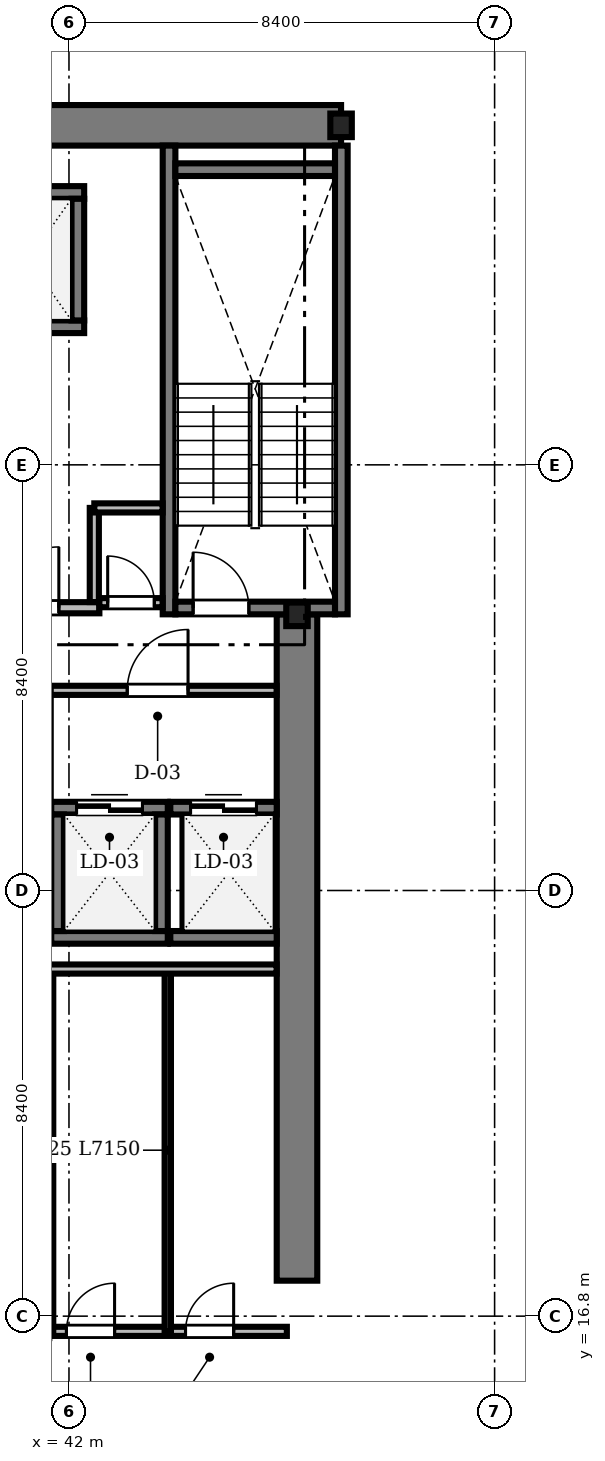
"""IFC4 building model, lengths in metres.
Left out: names, types, materials, properties, quantities, classifications, styles, units other than length and angle.
Written with IfcOpenShell. Run it as: python <this file> out.ifc"""

import sys

from ifc_helpers import new_model, si_unit, direction, frame, frame_2d, origin, origin_2d, place, context, subcontext, project, spatial, rectangle, i_section, extrude, source, transform, mapped, element, fill, save


model = new_model("IFC4")
c1 = context("Model", 3, precision=1e-05, world=origin(), true_north=direction((0.0, 1.0)))
c2 = subcontext(c1, "Body", "Model", "MODEL_VIEW")
j1 = project(units=[si_unit("LENGTHUNIT", "METRE"), si_unit("PLANEANGLEUNIT", "RADIAN")], contexts=[c1])
p1 = place(None, origin())
s1 = spatial("IfcSite", under=j1, at=p1, CompositionType="ELEMENT")
p2 = place(p1, origin())
s2 = spatial("IfcBuilding", under=s1, at=p2, CompositionType="ELEMENT")
p3 = place(p2, frame((0.0, 0.0, 126.1)))
s3 = spatial("IfcBuildingStorey", under=s2, at=p3, CompositionType="ELEMENT", Elevation=126.1)
m1 = source(origin(), c2, "Body", "SweptSolid", [
    extrude(rectangle(XDim=17.52, YDim=0.8, at=frame_2d((8.76, 0.0))), origin(), (0.0, 0.0, 1.0), 3.46),
])
p4 = place(p3, frame((29.85, 40.3, 0.0), z_axis=(0.0, 0.0, 1.0), x_axis=(1.0, 0.0, 0.0)))
e1 = element("IfcWall", 1, at=p4, inside=s3, PredefinedType="SHEAR", context=c2, shape_type="MappedRepresentation", body=[
    mapped(m1, transform((0.0, 0.0, 0.0), scale=1.0)),
])
m2 = source(origin(), c2, "Body", "SweptSolid", [
    extrude(rectangle(XDim=13.15, YDim=0.8, at=frame_2d((6.575, 0.0))), origin(), (0.0, 0.0, 1.0), 3.46),
])
p5 = place(p3, frame((46.5, 17.5, 0.0), z_axis=(0.0, 0.0, 1.0), x_axis=(0.0, 1.0, 0.0)))
e2 = element("IfcWall", 2, at=p5, inside=s3, PredefinedType="SHEAR", context=c2, shape_type="MappedRepresentation", body=[
    mapped(m2, transform((0.0, 0.0, 0.0), scale=1.0)),
])
m3 = source(origin(), c2, "Body", "SweptSolid", [
    extrude(i_section(OverallWidth=0.424, OverallDepth=0.465, WebThickness=0.035, FlangeThickness=0.056, FilletRadius=0.015, at=origin_2d()), origin(), (0.0, 0.0, 1.0), 3.46),
])
for number, where, z_axis, x_axis in (
    (3, (46.5, 30.65, 0.0), (0.0, 0.0, 1.0), (1.0, 0.0, 0.0)),
    (4, (47.37, 40.3, 0.0), (0.0, 0.0, 1.0), (1.0, 0.0, 0.0)),
):
    element("IfcColumn", number, at=place(p3, frame(where, z_axis=z_axis, x_axis=x_axis)), inside=s3, PredefinedType="COLUMN", context=c2, shape_type="MappedRepresentation", body=[
        mapped(m3, transform((0.0, 0.0, 0.0), scale=1.0)),
    ])
m4 = source(origin(), c2, "Body", "SweptSolid", [
    extrude(rectangle(XDim=9.25, YDim=0.25, at=frame_2d((4.625, 0.0))), origin(), (0.0, 0.0, 1.0), 3.5),
])
for number, where, z_axis, x_axis in (
    (5, (43.975, 30.65, 0.0), (0.0, 0.0, 1.0), (0.0, 1.0, 0.0)),
    (6, (47.375, 30.65, 0.0), (0.0, 0.0, 1.0), (0.0, 1.0, 0.0)),
):
    element("IfcWall", number, at=place(p3, frame(where, z_axis=z_axis, x_axis=x_axis)), inside=s3, PredefinedType="SOLIDWALL", context=c2, shape_type="MappedRepresentation", body=[
        mapped(m4, transform((0.0, 0.0, 0.0), scale=1.0)),
    ])
m5 = source(origin(), c2, "Body", "SweptSolid", [
    extrude(rectangle(XDim=3.15, YDim=0.25, at=frame_2d((1.575, 0.0))), origin(), (0.0, 0.0, 1.0), 3.5),
])
p6 = place(p3, frame((44.1, 39.425, 0.0), z_axis=(0.0, 0.0, 1.0), x_axis=(1.0, 0.0, 0.0)))
e7 = element("IfcWall", 7, at=p6, inside=s3, PredefinedType="SOLIDWALL", context=c2, shape_type="MappedRepresentation", body=[
    mapped(m5, transform((0.0, 0.0, 0.0), scale=1.0)),
])
p7 = place(p3, frame((44.1, 30.775, 0.0), z_axis=(0.0, 0.0, 1.0), x_axis=(1.0, 0.0, 0.0)))
e8 = element("IfcWall", 8, at=p7, inside=s3, PredefinedType="SOLIDWALL", context=c2, shape_type="MappedRepresentation", body=[
    mapped(m5, transform((0.0, 0.0, 0.0), scale=1.0)),
])
m6 = source(origin(), c2, "Body", "SweptSolid", [
    extrude(rectangle(XDim=1.1, YDim=2.2, at=frame_2d((0.55, 1.1))), frame((0.0, 0.135, 0.0), z_axis=(0.0, -1.0, 0.0), x_axis=(1.0, 0.0, 0.0)), (0.0, 0.0, 1.0), 0.27),
])
p8 = place(p7, frame((0.35, 0.0, 0.0)))
e9 = element("IfcOpeningElement", 9, at=p8, cuts=e8, PredefinedType="OPENING", context=c2, shape_type="MappedRepresentation", body=[
    mapped(m6, transform((0.0, 0.0, 0.0), scale=1.0)),
])
m7 = source(origin(), c2, "Body", "SweptSolid", [
    extrude(rectangle(XDim=2.8, YDim=0.22, at=frame_2d((1.4, 0.0))), origin(), (0.0, 0.0, 1.0), 3.46),
])
p9 = place(p3, frame((39.8, 30.78, 0.0), z_axis=(0.0, 0.0, 1.0), x_axis=(1.0, 0.0, 0.0)))
e10 = element("IfcWall", 10, at=p9, inside=s3, PredefinedType="SOLIDWALL", context=c2, shape_type="MappedRepresentation", body=[
    mapped(m7, transform((0.0, 0.0, 0.0), scale=1.0)),
])
m8 = source(origin(), c2, "Body", "SweptSolid", [
    extrude(rectangle(XDim=1.2, YDim=2.2, at=frame_2d((0.6, 1.1))), frame((0.0, 0.12, 0.0), z_axis=(0.0, -1.0, 0.0), x_axis=(1.0, 0.0, 0.0)), (0.0, 0.0, 1.0), 0.24),
])
p10 = place(p9, frame((0.8, 0.0, 0.0)))
e11 = element("IfcOpeningElement", 11, at=p10, cuts=e10, PredefinedType="OPENING", context=c2, shape_type="MappedRepresentation", body=[
    mapped(m8, transform((0.0, 0.0, 0.0), scale=1.0)),
])
m9 = source(origin(), c2, "Body", "SweptSolid", [
    extrude(rectangle(XDim=2.55, YDim=0.25, at=frame_2d((1.275, 0.0))), origin(), (0.0, 0.0, 1.0), 3.46),
])
p11 = place(p3, frame((39.75, 36.325, 0.0), z_axis=(0.0, 0.0, 1.0), x_axis=(1.0, 0.0, 0.0)))
e12 = element("IfcWall", 12, at=p11, inside=s3, PredefinedType="SOLIDWALL", context=c2, shape_type="MappedRepresentation", body=[
    mapped(m9, transform((0.0, 0.0, 0.0), scale=1.0)),
])
m10 = source(origin(), c2, "Body", "SweptSolid", [
    extrude(rectangle(XDim=1.2, YDim=2.25, at=frame_2d((0.6, 1.125))), frame((0.0, 0.135, 0.0), z_axis=(0.0, -1.0, 0.0), x_axis=(1.0, 0.0, 0.0)), (0.0, 0.0, 1.0), 0.27),
])
p12 = place(p11, frame((0.675, 0.0, 0.0)))
e13 = element("IfcOpeningElement", 13, at=p12, cuts=e12, PredefinedType="OPENING", context=c2, shape_type="MappedRepresentation", body=[
    mapped(m10, transform((0.0, 0.0, 0.0), scale=1.0)),
])
p13 = place(p3, frame((39.75, 38.975, 0.0), z_axis=(0.0, 0.0, 1.0), x_axis=(1.0, 0.0, 0.0)))
e14 = element("IfcWall", 14, at=p13, inside=s3, PredefinedType="SOLIDWALL", context=c2, shape_type="MappedRepresentation", body=[
    mapped(m9, transform((0.0, 0.0, 0.0), scale=1.0)),
])
m11 = source(origin(), c2, "Body", "SweptSolid", [
    extrude(rectangle(XDim=2.4, YDim=0.25, at=frame_2d((1.2, 0.0))), origin(), (0.0, 0.0, 1.0), 3.46),
])
p14 = place(p3, frame((42.175, 36.45, 0.0), z_axis=(0.0, 0.0, 1.0), x_axis=(0.0, 1.0, 0.0)))
e15 = element("IfcWall", 15, at=p14, inside=s3, PredefinedType="SOLIDWALL", context=c2, shape_type="MappedRepresentation", body=[
    mapped(m11, transform((0.0, 0.0, 0.0), scale=1.0)),
])
m12 = source(origin(), c2, "Body", "SweptSolid", [
    extrude(rectangle(XDim=2.3, YDim=0.25, at=frame_2d((1.15, 0.0))), origin(), (0.0, 0.0, 1.0), 3.46),
])
p15 = place(p3, frame((41.65, 24.275, 0.0), z_axis=(0.0, 0.0, 1.0), x_axis=(1.0, 0.0, 0.0)))
e16 = element("IfcWall", 16, at=p15, inside=s3, PredefinedType="SOLIDWALL", context=c2, shape_type="MappedRepresentation", body=[
    mapped(m12, transform((0.0, 0.0, 0.0), scale=1.0)),
])
p16 = place(p3, frame((41.65, 26.825, 0.0), z_axis=(0.0, 0.0, 1.0), x_axis=(1.0, 0.0, 0.0)))
e17 = element("IfcWall", 17, at=p16, inside=s3, PredefinedType="SOLIDWALL", context=c2, shape_type="MappedRepresentation", body=[
    mapped(m12, transform((0.0, 0.0, 0.0), scale=1.0)),
])
m13 = source(origin(), c2, "Body", "SweptSolid", [
    extrude(rectangle(XDim=1.3, YDim=2.3, at=frame_2d((0.65, 1.15))), frame((0.0, 0.135, 0.0), z_axis=(0.0, -1.0, 0.0), x_axis=(1.0, 0.0, 0.0)), (0.0, 0.0, 1.0), 0.27),
])
p17 = place(p16, frame((0.5, 0.0, 0.0)))
e18 = element("IfcOpeningElement", 18, at=p17, cuts=e17, PredefinedType="OPENING", context=c2, shape_type="MappedRepresentation", body=[
    mapped(m13, transform((0.0, 0.0, 0.0), scale=1.0)),
])
for number, where, z_axis, x_axis in (
    (19, (41.775, 24.4, 0.0), (0.0, 0.0, 1.0), (0.0, 1.0, 0.0)),
    (20, (43.825, 24.4, 0.0), (0.0, 0.0, 1.0), (0.0, 1.0, 0.0)),
):
    element("IfcWall", number, at=place(p3, frame(where, z_axis=z_axis, x_axis=x_axis)), inside=s3, PredefinedType="SOLIDWALL", context=c2, shape_type="MappedRepresentation", body=[
        mapped(m12, transform((0.0, 0.0, 0.0), scale=1.0)),
    ])
m14 = source(origin(), c2, "Body", "SweptSolid", [
    extrude(rectangle(XDim=2.1, YDim=0.25, at=frame_2d((1.05, 0.0))), origin(), (0.0, 0.0, 1.0), 3.46),
])
p18 = place(p3, frame((44.0, 24.275, 0.0), z_axis=(0.0, 0.0, 1.0), x_axis=(1.0, 0.0, 0.0)))
e21 = element("IfcWall", 21, at=p18, inside=s3, PredefinedType="SOLIDWALL", context=c2, shape_type="MappedRepresentation", body=[
    mapped(m14, transform((0.0, 0.0, 0.0), scale=1.0)),
])
p19 = place(p3, frame((44.0, 26.825, 0.0), z_axis=(0.0, 0.0, 1.0), x_axis=(1.0, 0.0, 0.0)))
e22 = element("IfcWall", 22, at=p19, inside=s3, PredefinedType="SOLIDWALL", context=c2, shape_type="MappedRepresentation", body=[
    mapped(m14, transform((0.0, 0.0, 0.0), scale=1.0)),
])
p20 = place(p19, frame((0.4, 0.0, 0.0)))
e23 = element("IfcOpeningElement", 23, at=p20, cuts=e22, PredefinedType="OPENING", context=c2, shape_type="MappedRepresentation", body=[
    mapped(m13, transform((0.0, 0.0, 0.0), scale=1.0)),
])
m15 = source(origin(), c2, "Body", "SweptSolid", [
    extrude(rectangle(XDim=4.548, YDim=0.18, at=frame_2d((2.274, 0.0))), origin(), (0.0, 0.0, 1.0), 3.092),
])
p21 = place(p3, frame((41.55, 29.15, 0.0), z_axis=(0.0, 0.0, 1.0), x_axis=(1.0, 0.0, 0.0)))
e24 = element("IfcWall", 24, at=p21, inside=s3, PredefinedType="PARTITIONING", context=c2, shape_type="MappedRepresentation", body=[
    mapped(m15, transform((0.0, 0.0, 0.0), scale=1.0)),
])
m16 = source(origin(), c2, "Body", "SweptSolid", [
    extrude(rectangle(XDim=1.2, YDim=2.2, at=frame_2d((0.6, 1.1))), frame((0.0, 0.1, 0.0), z_axis=(0.0, -1.0, 0.0), x_axis=(1.0, 0.0, 0.0)), (0.0, 0.0, 1.0), 0.2),
])
p22 = place(p21, frame((1.6, 0.0, 0.0)))
e25 = element("IfcOpeningElement", 25, at=p22, cuts=e24, PredefinedType="OPENING", context=c2, shape_type="MappedRepresentation", body=[
    mapped(m16, transform((0.0, 0.0, 0.0), scale=1.0)),
])
m17 = source(origin(), c2, "Body", "SweptSolid", [
    extrude(rectangle(XDim=4.7, YDim=0.18, at=frame_2d((2.35, 0.0))), origin(), (0.0, 0.0, 1.0), 2.852),
])
p23 = place(p3, frame((41.6, 16.5, 0.0), z_axis=(0.0, 0.0, 1.0), x_axis=(1.0, 0.0, 0.0)))
e26 = element("IfcWall", 26, at=p23, inside=s3, PredefinedType="PARTITIONING", context=c2, shape_type="MappedRepresentation", body=[
    mapped(m17, transform((0.0, 0.0, 0.0), scale=1.0)),
])
m18 = source(origin(), c2, "Body", "SweptSolid", [
    extrude(rectangle(XDim=0.95, YDim=2.15, at=frame_2d((0.475, 1.075))), frame((0.0, 0.1, 0.0), z_axis=(0.0, -1.0, 0.0), x_axis=(1.0, 0.0, 0.0)), (0.0, 0.0, 1.0), 0.2),
])
p24 = place(p23, frame((0.35, 0.0, 0.0)))
e27 = element("IfcOpeningElement", 27, at=p24, cuts=e26, PredefinedType="OPENING", context=c2, shape_type="MappedRepresentation", body=[
    mapped(m18, transform((0.0, 0.0, 0.0), scale=1.0)),
])
p25 = place(p23, frame((2.7, 0.0, 0.0)))
e28 = element("IfcOpeningElement", 28, at=p25, cuts=e26, PredefinedType="OPENING", context=c2, shape_type="MappedRepresentation", body=[
    mapped(m18, transform((0.0, 0.0, 0.0), scale=1.0)),
])
m19 = source(origin(), c2, "Body", "SweptSolid", [
    extrude(rectangle(XDim=1.248, YDim=0.18, at=frame_2d((0.624, 0.0))), origin(), (0.0, 0.0, 1.0), 3.46),
])
p26 = place(p3, frame((42.6, 30.88, 0.0), z_axis=(0.0, 0.0, 1.0), x_axis=(1.0, 0.0, 0.0)))
e29 = element("IfcWall", 29, at=p26, inside=s3, PredefinedType="PARTITIONING", context=c2, shape_type="MappedRepresentation", body=[
    mapped(m19, transform((0.0, 0.0, 0.0), scale=1.0)),
])
m20 = source(origin(), c2, "Body", "SweptSolid", [
    extrude(rectangle(XDim=0.92, YDim=2.1, at=frame_2d((0.46, 1.05))), frame((0.0, 0.1, 0.0), z_axis=(0.0, -1.0, 0.0), x_axis=(1.0, 0.0, 0.0)), (0.0, 0.0, 1.0), 0.2),
])
p27 = place(p26, frame((0.164, 0.0, 0.0)))
e30 = element("IfcOpeningElement", 30, at=p27, cuts=e29, PredefinedType="OPENING", context=c2, shape_type="MappedRepresentation", body=[
    mapped(m20, transform((0.0, 0.0, 0.0), scale=1.0)),
])
m21 = source(origin(), c2, "Body", "SweptSolid", [
    extrude(rectangle(XDim=7.15, YDim=0.18, at=frame_2d((3.575, 0.0))), origin(), (0.0, 0.0, 1.0), 2.852),
])
p28 = place(p3, frame((41.6, 16.5, 0.0), z_axis=(0.0, 0.0, 1.0), x_axis=(0.0, 1.0, 0.0)))
e31 = element("IfcWall", 31, at=p28, inside=s3, PredefinedType="PARTITIONING", context=c2, shape_type="MappedRepresentation", body=[
    mapped(m21, transform((0.0, 0.0, 0.0), scale=1.0)),
])
m22 = source(origin(), c2, "Body", "SweptSolid", [
    extrude(rectangle(XDim=7.15, YDim=0.125, at=frame_2d((3.575, 0.0))), origin(), (0.0, 0.0, 1.0), 2.852),
])
p29 = place(p3, frame((43.95, 16.5, 0.0), z_axis=(0.0, 0.0, 1.0), x_axis=(0.0, 1.0, 0.0)))
e32 = element("IfcWall", 32, at=p29, inside=s3, PredefinedType="PARTITIONING", context=c2, shape_type="MappedRepresentation", body=[
    mapped(m22, transform((0.0, 0.0, 0.0), scale=1.0)),
])
m23 = source(origin(), c2, "Body", "SweptSolid", [
    extrude(rectangle(XDim=4.498, YDim=0.18, at=frame_2d((2.249, 0.0))), origin(), (0.0, 0.0, 1.0), 3.46),
])
p30 = place(p3, frame((41.6, 23.65, 0.0), z_axis=(0.0, 0.0, 1.0), x_axis=(1.0, 0.0, 0.0)))
e33 = element("IfcWall", 33, at=p30, inside=s3, PredefinedType="PARTITIONING", context=c2, shape_type="MappedRepresentation", body=[
    mapped(m23, transform((0.0, 0.0, 0.0), scale=1.0)),
])
m24 = source(origin(), c2, "Body", "SweptSolid", [
    extrude(rectangle(XDim=1.858, YDim=0.18, at=frame_2d((0.929, 0.0))), origin(), (0.0, 0.0, 1.0), 3.46),
])
p31 = place(p3, frame((42.5, 30.892, 0.0), z_axis=(0.0, 0.0, 1.0), x_axis=(0.0, 1.0, 0.0)))
e34 = element("IfcWall", 34, at=p31, inside=s3, PredefinedType="PARTITIONING", context=c2, shape_type="MappedRepresentation", body=[
    mapped(m24, transform((0.0, 0.0, 0.0), scale=1.0)),
])
m25 = source(origin(), c2, "Body", "SweptSolid", [
    extrude(rectangle(XDim=1.348, YDim=0.18, at=frame_2d((0.674, 0.0))), origin(), (0.0, 0.0, 1.0), 3.46),
])
p32 = place(p3, frame((42.5, 32.75, 0.0), z_axis=(0.0, 0.0, 1.0), x_axis=(1.0, 0.0, 0.0)))
e35 = element("IfcWall", 35, at=p32, inside=s3, PredefinedType="PARTITIONING", context=c2, shape_type="MappedRepresentation", body=[
    mapped(m25, transform((0.0, 0.0, 0.0), scale=1.0)),
])
m26 = source(origin(), c2, "Body", "SweptSolid", [
    extrude(rectangle(XDim=1.1, YDim=2.2, at=frame_2d((0.55, 1.1))), frame((0.0, 0.025, 0.0), z_axis=(0.0, -1.0, 0.0), x_axis=(1.0, 0.0, 0.0)), (0.0, 0.0, 1.0), 0.05),
])
p33 = place(p8, origin())
e36 = element("IfcDoor", 36, at=p33, inside=s3, OperationType="SINGLE_SWING_LEFT", PredefinedType="DOOR", context=c2, shape_type="MappedRepresentation", body=[
    mapped(m26, transform((0.0, 0.0, 0.0), scale=1.0)),
])
fill(e9, e36)
m27 = source(origin(), c2, "Body", "SweptSolid", [
    extrude(rectangle(XDim=1.2, YDim=2.2, at=frame_2d((0.6, 1.1))), frame((0.0, 0.025, 0.0), z_axis=(0.0, -1.0, 0.0), x_axis=(1.0, 0.0, 0.0)), (0.0, 0.0, 1.0), 0.05),
])
p34 = place(p10, origin())
e37 = element("IfcDoor", 37, at=p34, inside=s3, OperationType="SINGLE_SWING_RIGHT", PredefinedType="DOOR", context=c2, shape_type="MappedRepresentation", body=[
    mapped(m27, transform((0.0, 0.0, 0.0), scale=1.0)),
])
fill(e11, e37)
m28 = source(origin(), c2, "Body", "SweptSolid", [
    extrude(rectangle(XDim=1.3, YDim=2.3, at=frame_2d((0.65, 1.15))), frame((0.0, 0.025, 0.0), z_axis=(0.0, -1.0, 0.0), x_axis=(1.0, 0.0, 0.0)), (0.0, 0.0, 1.0), 0.05),
])
p35 = place(p17, origin())
e38 = element("IfcDoor", 38, at=p35, inside=s3, OperationType="DOUBLE_DOOR_SLIDING", PredefinedType="DOOR", context=c2, shape_type="MappedRepresentation", body=[
    mapped(m28, transform((0.0, 0.0, 0.0), scale=1.0)),
])
fill(e18, e38)
p36 = place(p20, origin())
e39 = element("IfcDoor", 39, at=p36, inside=s3, OperationType="DOUBLE_DOOR_SLIDING", PredefinedType="DOOR", context=c2, shape_type="MappedRepresentation", body=[
    mapped(m28, transform((0.0, 0.0, 0.0), scale=1.0)),
])
fill(e23, e39)
p37 = place(p22, origin())
e40 = element("IfcDoor", 40, at=p37, inside=s3, OperationType="SINGLE_SWING_RIGHT", PredefinedType="DOOR", context=c2, shape_type="MappedRepresentation", body=[
    mapped(m27, transform((0.0, 0.0, 0.0), scale=1.0)),
])
fill(e25, e40)
m29 = source(origin(), c2, "Body", "SweptSolid", [
    extrude(rectangle(XDim=0.95, YDim=2.15, at=frame_2d((0.475, 1.075))), frame((0.0, 0.025, 0.0), z_axis=(0.0, -1.0, 0.0), x_axis=(1.0, 0.0, 0.0)), (0.0, 0.0, 1.0), 0.05),
])
p38 = place(p24, origin())
e41 = element("IfcDoor", 41, at=p38, inside=s3, OperationType="SINGLE_SWING_RIGHT", PredefinedType="DOOR", context=c2, shape_type="MappedRepresentation", body=[
    mapped(m29, transform((0.0, 0.0, 0.0), scale=1.0)),
])
fill(e27, e41)
p39 = place(p25, origin())
e42 = element("IfcDoor", 42, at=p39, inside=s3, OperationType="SINGLE_SWING_RIGHT", PredefinedType="DOOR", context=c2, shape_type="MappedRepresentation", body=[
    mapped(m29, transform((0.0, 0.0, 0.0), scale=1.0)),
])
fill(e28, e42)
m30 = source(origin(), c2, "Body", "SweptSolid", [
    extrude(rectangle(XDim=0.92, YDim=2.1, at=frame_2d((0.46, 1.05))), frame((0.0, 0.025, 0.0), z_axis=(0.0, -1.0, 0.0), x_axis=(1.0, 0.0, 0.0)), (0.0, 0.0, 1.0), 0.05),
])
p40 = place(p27, origin())
e43 = element("IfcDoor", 43, at=p40, inside=s3, OperationType="SINGLE_SWING_LEFT", PredefinedType="DOOR", context=c2, shape_type="MappedRepresentation", body=[
    mapped(m30, transform((0.0, 0.0, 0.0), scale=1.0)),
])
fill(e30, e43)
save(model, sys.argv[1])
